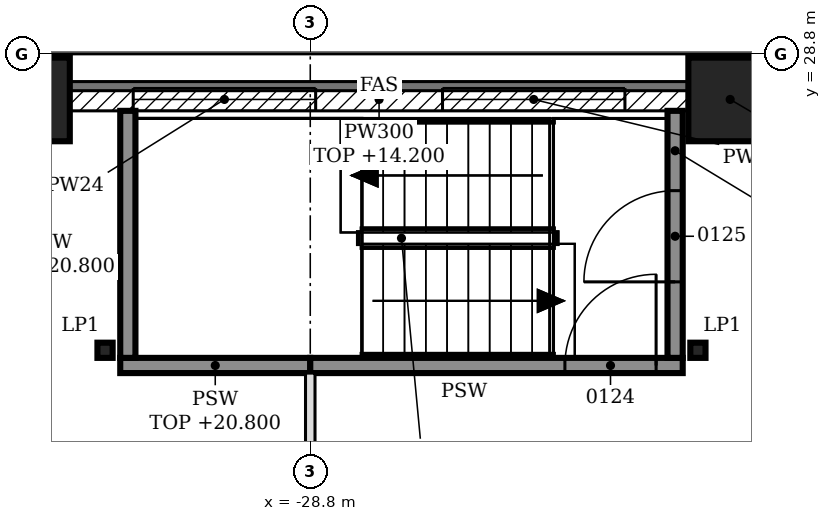
"""IFC4 building model, lengths in metres.
Left out: names, types, materials, properties, quantities, classifications, styles, units other than length and angle.
Written with IfcOpenShell. Run it as: python <this file> out.ifc"""

import sys

from ifc_helpers import new_model, si_unit, direction, frame, frame_2d, origin, origin_2d, place, context, subcontext, project, spatial, polyline, rectangle, hollow_rectangle, i_section, outline, extrude, element, fill, save


model = new_model("IFC4")
c1 = context("Model", 3, precision=1e-05, world=origin(), true_north=direction((0.0, 1.0)))
c2 = subcontext(c1, "Body", "Model", "MODEL_VIEW")
j1 = project(units=[si_unit("LENGTHUNIT", "METRE"), si_unit("PLANEANGLEUNIT", "RADIAN")], contexts=[c1])
p1 = place(None, origin())
s1 = spatial("IfcSite", under=j1, at=p1, CompositionType="ELEMENT")
p2 = place(p1, origin())
s2 = spatial("IfcBuilding", under=s1, at=p2, CompositionType="ELEMENT")
p3 = place(p2, frame((0.0, 0.0, 9.0)))
s3 = spatial("IfcBuildingStorey", under=s2, at=p3, CompositionType="ELEMENT", Elevation=9.0)
for number, where, z_axis, x_axis in (
    (1, (-23.276, 28.2, 0.0), (0.0, 0.0, 1.0), (1.0, 0.0, 0.0)),
    (2, (-32.514, 28.2, 0.0), (0.0, 0.0, 1.0), (1.0, 0.0, 0.0)),
):
    element("IfcColumn", number, at=place(p3, frame(where, z_axis=z_axis, x_axis=x_axis)), inside=s3, PredefinedType="COLUMN", context=c2, shape_type="SweptSolid", body=[
        extrude(hollow_rectangle(XDim=1.1, YDim=1.1, WallThickness=0.06, at=origin_2d()), origin(), (0.0, 0.0, 1.0), 6.0),
    ])
for number, where, z_axis, x_axis in (
    (3, (-31.5, 24.9, 0.0), (0.0, 0.0, 1.0), (1.0, 0.0, 0.0)),
    (4, (-23.7, 24.9, 0.0), (0.0, 0.0, 1.0), (1.0, 0.0, 0.0)),
):
    element("IfcColumn", number, at=place(p3, frame(where, z_axis=z_axis, x_axis=x_axis)), inside=s3, PredefinedType="COLUMN", context=c2, shape_type="SweptSolid", body=[
        extrude(i_section(OverallWidth=0.2, OverallDepth=0.2, WebThickness=0.009, FlangeThickness=0.015, FilletRadius=0.018, at=origin_2d()), origin(), (0.0, 0.0, 1.0), 6.0),
    ])
p4 = place(p3, frame((-23.826, 28.2, 0.0), z_axis=(0.0, 0.0, 1.0), x_axis=(-1.0, 0.0, 0.0)))
e5 = element("IfcWall", 5, at=p4, inside=s3, PredefinedType="SOLIDWALL", context=c2, shape_type="SweptSolid", body=[
    extrude(rectangle(XDim=8.138, YDim=0.3, at=frame_2d((4.069, 0.0))), origin(), (0.0, 0.0, 1.0), 5.2),
])
p5 = place(p4, frame((0.834, 0.0, 0.9)))
e6 = element("IfcOpeningElement", 6, at=p5, cuts=e5, PredefinedType="OPENING", context=c2, shape_type="SweptSolid", body=[
    extrude(rectangle(XDim=2.4, YDim=2.4, at=frame_2d((1.2, 1.2))), frame((0.0, 0.16, 0.0), z_axis=(0.0, -1.0, 0.0), x_axis=(1.0, 0.0, 0.0)), (0.0, 0.0, 1.0), 0.32),
])
p6 = place(p4, frame((4.903, 0.0, 0.9)))
e7 = element("IfcOpeningElement", 7, at=p6, cuts=e5, PredefinedType="OPENING", context=c2, shape_type="SweptSolid", body=[
    extrude(rectangle(XDim=2.4, YDim=2.4, at=frame_2d((1.2, 1.2))), frame((0.0, 0.16, 0.0), z_axis=(0.0, -1.0, 0.0), x_axis=(1.0, 0.0, 0.0)), (0.0, 0.0, 1.0), 0.32),
])
p7 = place(p3, frame((-28.8, -24.6, 0.0), z_axis=(0.0, 0.0, 1.0), x_axis=(0.0, 1.0, 0.0)))
e8 = element("IfcWall", 8, at=p7, inside=s3, PredefinedType="PARTITIONING", context=c2, shape_type="SweptSolid", body=[
    extrude(outline(polyline([(0.0, 0.0), (49.2, 0.0), (49.2, 11.8), (43.95, 11.8), (43.948, 11.18), (43.65, 11.18), (43.648, 11.8), (39.15, 11.8), (39.148, 11.18), (38.85, 11.18), (38.848, 11.8), (34.35, 11.8), (34.348, 11.18), (34.05, 11.18), (34.048, 11.8), (29.55, 11.8), (29.548, 11.18), (29.25, 11.18), (29.248, 11.8), (24.75, 11.8), (24.748, 11.18), (24.45, 11.18), (24.448, 11.8), (19.95, 11.8), (19.948, 11.18), (19.65, 11.18), (19.648, 11.8), (15.15, 11.8), (15.148, 11.18), (14.85, 11.18), (14.848, 11.8), (10.35, 11.8), (10.348, 11.18), (10.05, 11.18), (10.048, 11.8), (5.55, 11.8), (5.548, 11.18), (5.25, 11.18), (5.248, 11.8), (0.0, 11.8), (0.0, 0.0)])), frame((0.0, 0.062, 0.0), z_axis=(0.0, -1.0, 0.0), x_axis=(1.0, 0.0, 0.0)), (0.0, 0.0, 1.0), 0.125),
])
p8 = place(p7, frame((1.7, 0.0, 0.0)))
e9 = element("IfcOpeningElement", 9, at=p8, cuts=e8, PredefinedType="OPENING", context=c2, shape_type="SweptSolid", body=[
    extrude(rectangle(XDim=1.8, YDim=2.1, at=frame_2d((0.9, 1.05))), frame((0.0, 0.073, 0.0), z_axis=(0.0, -1.0, 0.0), x_axis=(1.0, 0.0, 0.0)), (0.0, 0.0, 1.0), 0.145),
])
p9 = place(p7, frame((5.7, 0.0, 0.0)))
e10 = element("IfcOpeningElement", 10, at=p9, cuts=e8, PredefinedType="OPENING", context=c2, shape_type="SweptSolid", body=[
    extrude(rectangle(XDim=1.8, YDim=2.1, at=frame_2d((0.9, 1.05))), frame((0.0, 0.073, 0.0), z_axis=(0.0, -1.0, 0.0), x_axis=(1.0, 0.0, 0.0)), (0.0, 0.0, 1.0), 0.145),
])
p10 = place(p7, frame((12.7, 0.0, 0.0)))
e11 = element("IfcOpeningElement", 11, at=p10, cuts=e8, PredefinedType="OPENING", context=c2, shape_type="SweptSolid", body=[
    extrude(rectangle(XDim=1.8, YDim=2.1, at=frame_2d((0.9, 1.05))), frame((0.0, 0.073, 0.0), z_axis=(0.0, -1.0, 0.0), x_axis=(1.0, 0.0, 0.0)), (0.0, 0.0, 1.0), 0.145),
])
p11 = place(p7, frame((16.2, 0.0, 0.0)))
e12 = element("IfcOpeningElement", 12, at=p11, cuts=e8, PredefinedType="OPENING", context=c2, shape_type="SweptSolid", body=[
    extrude(rectangle(XDim=1.8, YDim=2.1, at=frame_2d((0.9, 1.05))), frame((0.0, 0.073, 0.0), z_axis=(0.0, -1.0, 0.0), x_axis=(1.0, 0.0, 0.0)), (0.0, 0.0, 1.0), 0.145),
])
p12 = place(p7, frame((31.2, 0.0, 0.0)))
e13 = element("IfcOpeningElement", 13, at=p12, cuts=e8, PredefinedType="OPENING", context=c2, shape_type="SweptSolid", body=[
    extrude(rectangle(XDim=1.8, YDim=2.1, at=frame_2d((0.9, 1.05))), frame((0.0, 0.073, 0.0), z_axis=(0.0, -1.0, 0.0), x_axis=(1.0, 0.0, 0.0)), (0.0, 0.0, 1.0), 0.145),
])
p13 = place(p7, frame((34.7, 0.0, 0.0)))
e14 = element("IfcOpeningElement", 14, at=p13, cuts=e8, PredefinedType="OPENING", context=c2, shape_type="SweptSolid", body=[
    extrude(rectangle(XDim=1.8, YDim=2.1, at=frame_2d((0.9, 1.05))), frame((0.0, 0.073, 0.0), z_axis=(0.0, -1.0, 0.0), x_axis=(1.0, 0.0, 0.0)), (0.0, 0.0, 1.0), 0.145),
])
p14 = place(p7, frame((41.7, 0.0, 0.0)))
e15 = element("IfcOpeningElement", 15, at=p14, cuts=e8, PredefinedType="OPENING", context=c2, shape_type="SweptSolid", body=[
    extrude(rectangle(XDim=1.8, YDim=2.1, at=frame_2d((0.9, 1.05))), frame((0.0, 0.073, 0.0), z_axis=(0.0, -1.0, 0.0), x_axis=(1.0, 0.0, 0.0)), (0.0, 0.0, 1.0), 0.145),
])
p15 = place(p7, frame((45.7, 0.0, 0.0)))
e16 = element("IfcOpeningElement", 16, at=p15, cuts=e8, PredefinedType="OPENING", context=c2, shape_type="SweptSolid", body=[
    extrude(rectangle(XDim=1.8, YDim=2.1, at=frame_2d((0.9, 1.05))), frame((0.0, 0.073, 0.0), z_axis=(0.0, -1.0, 0.0), x_axis=(1.0, 0.0, 0.0)), (0.0, 0.0, 1.0), 0.145),
])
p16 = place(p3, frame((-31.3, 24.7, 0.0), z_axis=(0.0, 0.0, 1.0), x_axis=(1.0, 0.0, 0.0)))
e17 = element("IfcWall", 17, at=p16, inside=s3, PredefinedType="SOLIDWALL", context=c2, shape_type="SweptSolid", body=[
    extrude(rectangle(XDim=2.5, YDim=0.2, at=frame_2d((1.25, 0.0))), origin(), (0.0, 0.0, 1.0), 11.8),
])
p17 = place(p3, frame((-28.8, 24.7, 0.0), z_axis=(0.0, 0.0, 1.0), x_axis=(1.0, 0.0, 0.0)))
e18 = element("IfcWall", 18, at=p17, inside=s3, PredefinedType="SOLIDWALL", context=c2, shape_type="SweptSolid", body=[
    extrude(rectangle(XDim=4.9, YDim=0.2, at=frame_2d((2.45, 0.0))), origin(), (0.0, 0.0, 1.0), 5.8),
])
p18 = place(p17, frame((3.35, 0.0, 0.0)))
e19 = element("IfcOpeningElement", 19, at=p18, cuts=e18, PredefinedType="OPENING", context=c2, shape_type="SweptSolid", body=[
    extrude(rectangle(XDim=1.2, YDim=2.1, at=frame_2d((0.6, 1.05))), frame((0.0, 0.11, 0.0), z_axis=(0.0, -1.0, 0.0), x_axis=(1.0, 0.0, 0.0)), (0.0, 0.0, 1.0), 0.22),
])
p19 = place(p3, frame((-31.2, 24.8, 0.0), z_axis=(0.0, 0.0, 1.0), x_axis=(0.0, 1.0, 0.0)))
e20 = element("IfcWall", 20, at=p19, inside=s3, PredefinedType="SOLIDWALL", context=c2, shape_type="SweptSolid", body=[
    extrude(rectangle(XDim=3.25, YDim=0.2, at=frame_2d((1.625, 0.0))), origin(), (0.0, 0.0, 1.0), 11.8),
])
p20 = place(p3, frame((-24.0, 24.8, 0.0), z_axis=(0.0, 0.0, 1.0), x_axis=(0.0, 1.0, 0.0)))
e21 = element("IfcWall", 21, at=p20, inside=s3, PredefinedType="SOLIDWALL", context=c2, shape_type="SweptSolid", body=[
    extrude(rectangle(XDim=3.25, YDim=0.2, at=frame_2d((1.625, 0.0))), origin(), (0.0, 0.0, 1.0), 5.8),
])
p21 = place(p20, frame((1.0, 0.0, 0.0)))
e22 = element("IfcOpeningElement", 22, at=p21, cuts=e21, PredefinedType="OPENING", context=c2, shape_type="SweptSolid", body=[
    extrude(rectangle(XDim=1.2, YDim=2.1, at=frame_2d((0.6, 1.05))), frame((0.0, 0.11, 0.0), z_axis=(0.0, -1.0, 0.0), x_axis=(1.0, 0.0, 0.0)), (0.0, 0.0, 1.0), 0.22),
])
p22 = place(p5, origin())
e23 = element("IfcWindow", 23, at=p22, inside=s3, PartitioningType="SINGLE_PANEL", PredefinedType="WINDOW", context=c2, shape_type="SweptSolid", body=[
    extrude(rectangle(XDim=2.4, YDim=2.4, at=frame_2d((1.2, 1.2))), frame((0.0, 0.03, 0.0), z_axis=(0.0, -1.0, 0.0), x_axis=(1.0, 0.0, 0.0)), (0.0, 0.0, 1.0), 0.06),
])
fill(e6, e23)
p23 = place(p6, origin())
e24 = element("IfcWindow", 24, at=p23, inside=s3, PartitioningType="SINGLE_PANEL", PredefinedType="WINDOW", context=c2, shape_type="SweptSolid", body=[
    extrude(rectangle(XDim=2.4, YDim=2.4, at=frame_2d((1.2, 1.2))), frame((0.0, 0.03, 0.0), z_axis=(0.0, -1.0, 0.0), x_axis=(1.0, 0.0, 0.0)), (0.0, 0.0, 1.0), 0.06),
])
fill(e7, e24)
p24 = place(p18, origin())
e25 = element("IfcDoor", 25, at=p24, inside=s3, OperationType="SINGLE_SWING_RIGHT", PredefinedType="DOOR", context=c2, shape_type="SweptSolid", body=[
    extrude(rectangle(XDim=1.2, YDim=2.1, at=frame_2d((0.6, 1.05))), frame((0.0, 0.025, 0.0), z_axis=(0.0, -1.0, 0.0), x_axis=(1.0, 0.0, 0.0)), (0.0, 0.0, 1.0), 0.05),
])
fill(e19, e25)
p25 = place(p21, origin())
e26 = element("IfcDoor", 26, at=p25, inside=s3, OperationType="SINGLE_SWING_LEFT", PredefinedType="DOOR", context=c2, shape_type="SweptSolid", body=[
    extrude(rectangle(XDim=1.2, YDim=2.1, at=frame_2d((0.6, 1.05))), frame((0.0, 0.025, 0.0), z_axis=(0.0, -1.0, 0.0), x_axis=(1.0, 0.0, 0.0)), (0.0, 0.0, 1.0), 0.05),
])
fill(e22, e26)
save(model, sys.argv[1])
